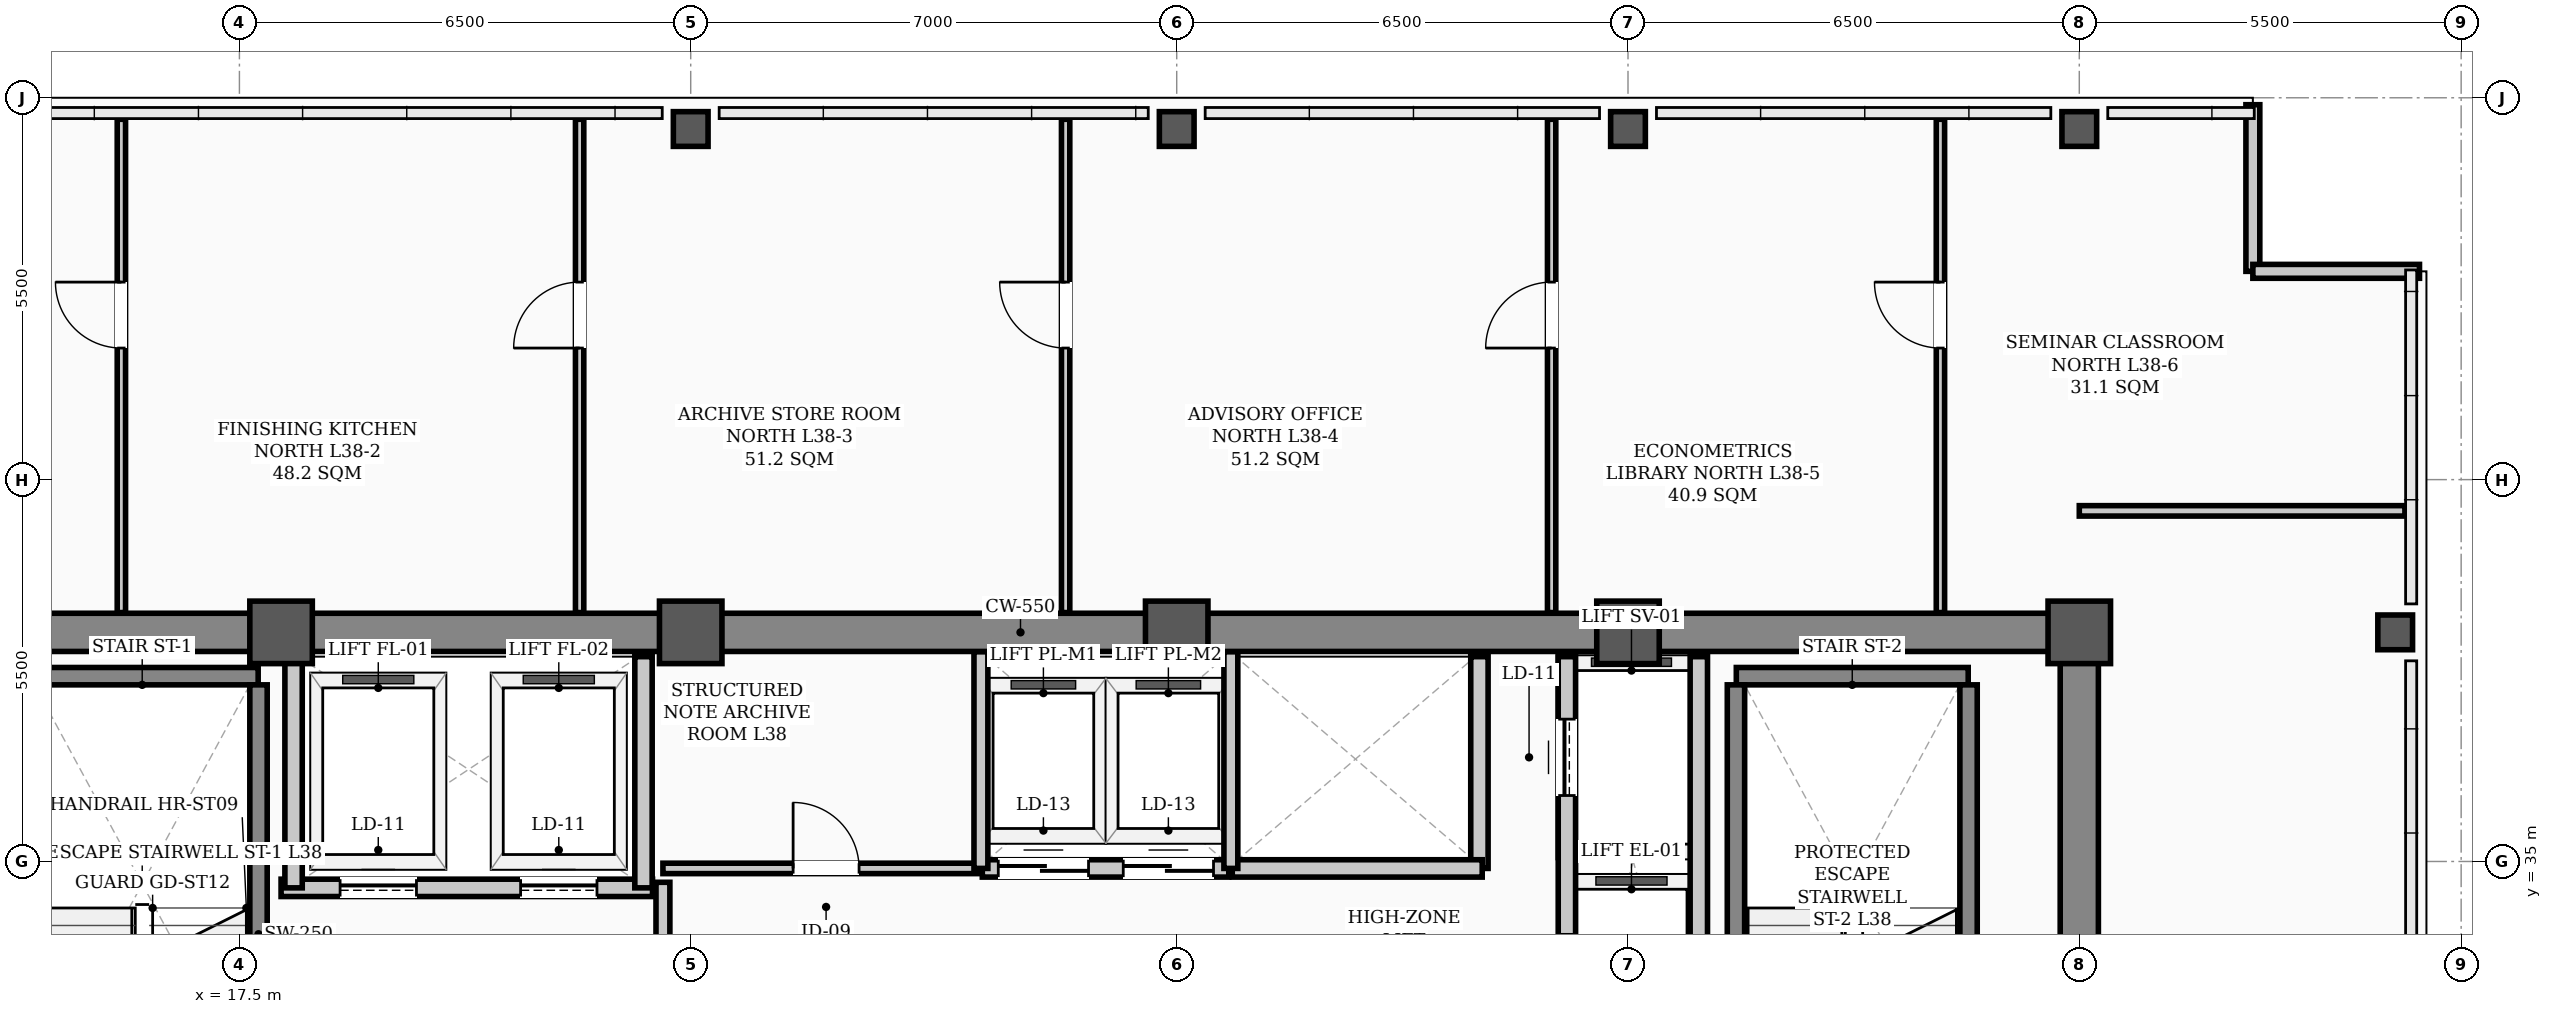
"""IFC4 building model, lengths in metres.
Left out: names, types, materials, properties, quantities, classifications, styles, units other than length and angle.
Written with IfcOpenShell. Run it as: python <this file> out.ifc"""

import sys

from ifc_helpers import new_model, si_unit, direction, frame, frame_2d, origin, origin_2d, place, context, subcontext, project, spatial, rectangle, hollow_rectangle, extrude, element, fill, save


model = new_model("IFC4")
c1 = context("Model", 3, precision=1e-05, world=origin(), true_north=direction((0.0, 1.0)))
c2 = subcontext(c1, "Body", "Model", "MODEL_VIEW")
j1 = project(units=[si_unit("LENGTHUNIT", "METRE"), si_unit("PLANEANGLEUNIT", "RADIAN")], contexts=[c1])
p1 = place(None, origin())
s1 = spatial("IfcSite", under=j1, at=p1, CompositionType="ELEMENT")
p2 = place(p1, origin())
s2 = spatial("IfcBuilding", under=s1, at=p2, CompositionType="ELEMENT")
p3 = place(p2, frame((0.0, 0.0, 153.9)))
s3 = spatial("IfcBuildingStorey", under=s2, at=p3, CompositionType="ELEMENT", Elevation=153.9)
for number, where, z_axis, x_axis in (
    (1, (18.1, 38.3, 0.0), (0.0, 0.0, 1.0), (1.0, 0.0, 0.0)),
    (2, (24.0, 38.3, 0.0), (0.0, 0.0, 1.0), (1.0, 0.0, 0.0)),
    (3, (31.0, 38.3, 0.0), (0.0, 0.0, 1.0), (1.0, 0.0, 0.0)),
    (4, (37.5, 38.3, 0.0), (0.0, 0.0, 1.0), (1.0, 0.0, 0.0)),
    (5, (44.0, 38.3, 0.0), (0.0, 0.0, 1.0), (1.0, 0.0, 0.0)),
):
    element("IfcColumn", number, at=place(p3, frame(where, z_axis=z_axis, x_axis=x_axis)), inside=s3, PredefinedType="COLUMN", context=c2, shape_type="SweptSolid", body=[
        extrude(hollow_rectangle(XDim=0.9, YDim=0.9, WallThickness=0.035, InnerFilletRadius=0.017, OuterFilletRadius=0.052, at=origin_2d()), origin(), (0.0, 0.0, 1.0), 3.9),
    ])
for number, where, z_axis, x_axis in (
    (6, (24.0, 45.55, 0.0), (0.0, 0.0, 1.0), (1.0, 0.0, 0.0)),
    (7, (31.0, 45.55, 0.0), (0.0, 0.0, 1.0), (1.0, 0.0, 0.0)),
    (8, (37.5, 45.55, 0.0), (0.0, 0.0, 1.0), (1.0, 0.0, 0.0)),
    (9, (44.0, 45.55, 0.0), (0.0, 0.0, 1.0), (1.0, 0.0, 0.0)),
    (10, (48.55, 38.3, 0.0), (0.0, 0.0, 1.0), (1.0, 0.0, 0.0)),
):
    element("IfcColumn", number, at=place(p3, frame(where, z_axis=z_axis, x_axis=x_axis)), inside=s3, PredefinedType="COLUMN", context=c2, shape_type="SweptSolid", body=[
        extrude(hollow_rectangle(XDim=0.5, YDim=0.5, WallThickness=0.024, InnerFilletRadius=0.012, OuterFilletRadius=0.036, at=origin_2d()), origin(), (0.0, 0.0, 1.0), 3.9),
    ])
for number, where, z_axis, x_axis in (
    (11, (46.5, 45.9, 0.0), (0.0, 0.0, 1.0), (0.0, -1.0, 0.0)),
    (12, (46.5, 43.5, 0.0), (0.0, 0.0, 1.0), (1.0, 0.0, 0.0)),
):
    element("IfcWall", number, at=place(p3, frame(where, z_axis=z_axis, x_axis=x_axis)), inside=s3, PredefinedType="PARAPET", context=c2, shape_type="SweptSolid", body=[
        extrude(rectangle(XDim=2.4, YDim=0.2, at=frame_2d((1.2, 0.0))), origin(), (0.0, 0.0, 1.0), 1.2),
    ])
p4 = place(p3, frame((13.5, 38.3, 0.0), z_axis=(0.0, 0.0, 1.0), x_axis=(1.0, 0.0, 0.0)))
e13 = element("IfcWall", 13, at=p4, inside=s3, PredefinedType="SHEAR", context=c2, shape_type="SweptSolid", body=[
    extrude(rectangle(XDim=30.5, YDim=0.55, at=frame_2d((15.25, 0.0))), origin(), (0.0, 0.0, 1.0), 3.72),
])
p5 = place(p3, frame((44.0, 29.35, 0.0), z_axis=(0.0, 0.0, 1.0), x_axis=(0.0, 1.0, 0.0)))
e14 = element("IfcWall", 14, at=p5, inside=s3, PredefinedType="SHEAR", context=c2, shape_type="SweptSolid", body=[
    extrude(rectangle(XDim=8.6, YDim=0.55, at=frame_2d((4.3, 0.0))), origin(), (0.0, 0.0, 1.0), 3.72),
])
p6 = place(p3, frame((14.43, 37.669, 0.0), z_axis=(0.0, 0.0, 1.0), x_axis=(1.0, 0.0, 0.0)))
e15 = element("IfcWall", 15, at=p6, inside=s3, PredefinedType="STANDARD", context=c2, shape_type="SweptSolid", body=[
    extrude(rectangle(XDim=3.34, YDim=0.25, at=frame_2d((1.67, 0.0))), origin(), (0.0, 0.0, 1.0), 3.72),
])
p7 = place(p3, frame((17.775, 30.36, 0.0), z_axis=(0.0, 0.0, 1.0), x_axis=(0.0, 1.0, 0.0)))
e16 = element("IfcWall", 16, at=p7, inside=s3, PredefinedType="STANDARD", context=c2, shape_type="SweptSolid", body=[
    extrude(rectangle(XDim=7.184, YDim=0.25, at=frame_2d((3.592, 0.0))), origin(), (0.0, 0.0, 1.0), 3.72),
])
p8 = place(p3, frame((39.06, 37.669, 0.0), z_axis=(0.0, 0.0, 1.0), x_axis=(1.0, 0.0, 0.0)))
e17 = element("IfcWall", 17, at=p8, inside=s3, PredefinedType="STANDARD", context=c2, shape_type="SweptSolid", body=[
    extrude(rectangle(XDim=3.34, YDim=0.25, at=frame_2d((1.67, 0.0))), origin(), (0.0, 0.0, 1.0), 3.72),
])
for number, where, z_axis, x_axis in (
    (18, (39.055, 30.36, 0.0), (0.0, 0.0, 1.0), (0.0, 1.0, 0.0)),
    (19, (42.405, 30.36, 0.0), (0.0, 0.0, 1.0), (0.0, 1.0, 0.0)),
):
    element("IfcWall", number, at=place(p3, frame(where, z_axis=z_axis, x_axis=x_axis)), inside=s3, PredefinedType="STANDARD", context=c2, shape_type="SweptSolid", body=[
        extrude(rectangle(XDim=7.184, YDim=0.25, at=frame_2d((3.592, 0.0))), origin(), (0.0, 0.0, 1.0), 3.72),
    ])
p9 = place(p3, frame((18.1, 34.62, 0.0), z_axis=(0.0, 0.0, 1.0), x_axis=(1.0, 0.0, 0.0)))
e20 = element("IfcWall", 20, at=p9, inside=s3, PredefinedType="STANDARD", context=c2, shape_type="SweptSolid", body=[
    extrude(rectangle(XDim=5.35, YDim=0.25, at=frame_2d((2.675, 0.0))), origin(), (0.0, 0.0, 1.0), 3.72),
])
p10 = place(p9, frame((0.85, 0.0, 0.0)))
e21 = element("IfcOpeningElement", 21, at=p10, cuts=e20, PredefinedType="OPENING", context=c2, shape_type="SweptSolid", body=[
    extrude(rectangle(XDim=1.1, YDim=2.08, at=frame_2d((0.55, 1.04))), frame((0.0, 0.135, 0.0), z_axis=(0.0, -1.0, 0.0), x_axis=(1.0, 0.0, 0.0)), (0.0, 0.0, 1.0), 0.27),
])
p11 = place(p9, frame((3.45, 0.0, 0.0)))
e22 = element("IfcOpeningElement", 22, at=p11, cuts=e20, PredefinedType="OPENING", context=c2, shape_type="SweptSolid", body=[
    extrude(rectangle(XDim=1.1, YDim=2.08, at=frame_2d((0.55, 1.04))), frame((0.0, 0.135, 0.0), z_axis=(0.0, -1.0, 0.0), x_axis=(1.0, 0.0, 0.0)), (0.0, 0.0, 1.0), 0.27),
])
p12 = place(p3, frame((36.62, 31.95, 0.0), z_axis=(0.0, 0.0, 1.0), x_axis=(0.0, 1.0, 0.0)))
e23 = element("IfcWall", 23, at=p12, inside=s3, PredefinedType="STANDARD", context=c2, shape_type="SweptSolid", body=[
    extrude(rectangle(XDim=6.0, YDim=0.25, at=frame_2d((3.0, 0.0))), origin(), (0.0, 0.0, 1.0), 3.35),
])
p13 = place(p12, frame((0.9, 0.0, 0.0)))
e24 = element("IfcOpeningElement", 24, at=p13, cuts=e23, PredefinedType="OPENING", context=c2, shape_type="SweptSolid", body=[
    extrude(rectangle(XDim=1.1, YDim=2.08, at=frame_2d((0.55, 1.04))), frame((0.0, 0.135, 0.0), z_axis=(0.0, -1.0, 0.0), x_axis=(1.0, 0.0, 0.0)), (0.0, 0.0, 1.0), 0.27),
])
p14 = place(p12, frame((4.0, 0.0, 0.0)))
e25 = element("IfcOpeningElement", 25, at=p14, cuts=e23, PredefinedType="OPENING", context=c2, shape_type="SweptSolid", body=[
    extrude(rectangle(XDim=1.1, YDim=2.08, at=frame_2d((0.55, 1.04))), frame((0.0, 0.135, 0.0), z_axis=(0.0, -1.0, 0.0), x_axis=(1.0, 0.0, 0.0)), (0.0, 0.0, 1.0), 0.27),
])
p15 = place(p3, frame((38.52, 31.95, 0.0), z_axis=(0.0, 0.0, 1.0), x_axis=(0.0, 1.0, 0.0)))
e26 = element("IfcWall", 26, at=p15, inside=s3, PredefinedType="STANDARD", context=c2, shape_type="SweptSolid", body=[
    extrude(rectangle(XDim=6.0, YDim=0.25, at=frame_2d((3.0, 0.0))), origin(), (0.0, 0.0, 1.0), 3.35),
])
for number, where, z_axis, x_axis in (
    (27, (18.28, 34.62, 0.0), (0.0, 0.0, 1.0), (0.0, 1.0, 0.0)),
    (28, (23.32, 34.62, 0.0), (0.0, 0.0, 1.0), (0.0, 1.0, 0.0)),
):
    element("IfcWall", number, at=place(p3, frame(where, z_axis=z_axis, x_axis=x_axis)), inside=s3, PredefinedType="STANDARD", context=c2, shape_type="SweptSolid", body=[
        extrude(rectangle(XDim=3.33, YDim=0.25, at=frame_2d((1.665, 0.0))), origin(), (0.0, 0.0, 1.0), 3.35),
    ])
p16 = place(p3, frame((35.36, 34.9, 0.0), z_axis=(0.0, 0.0, 1.0), x_axis=(0.0, 1.0, 0.0)))
e29 = element("IfcWall", 29, at=p16, inside=s3, PredefinedType="STANDARD", context=c2, shape_type="SweptSolid", body=[
    extrude(rectangle(XDim=3.05, YDim=0.25, at=frame_2d((1.525, 0.0))), origin(), (0.0, 0.0, 1.0), 3.35),
])
p17 = place(p3, frame((28.2, 34.9, 0.0), z_axis=(0.0, 0.0, 1.0), x_axis=(1.0, 0.0, 0.0)))
e30 = element("IfcWall", 30, at=p17, inside=s3, PredefinedType="STANDARD", context=c2, shape_type="SweptSolid", body=[
    extrude(rectangle(XDim=3.55, YDim=0.25, at=frame_2d((1.775, 0.0))), origin(), (0.0, 0.0, 1.0), 3.72),
])
p18 = place(p17, frame((0.23, 0.0, 0.0)))
e31 = element("IfcOpeningElement", 31, at=p18, cuts=e30, PredefinedType="OPENING", context=c2, shape_type="SweptSolid", body=[
    extrude(rectangle(XDim=1.3, YDim=2.08, at=frame_2d((0.65, 1.04))), frame((0.0, 0.135, 0.0), z_axis=(0.0, -1.0, 0.0), x_axis=(1.0, 0.0, 0.0)), (0.0, 0.0, 1.0), 0.27),
])
p19 = place(p17, frame((2.03, 0.0, 0.0)))
e32 = element("IfcOpeningElement", 32, at=p19, cuts=e30, PredefinedType="OPENING", context=c2, shape_type="SweptSolid", body=[
    extrude(rectangle(XDim=1.3, YDim=2.08, at=frame_2d((0.65, 1.04))), frame((0.0, 0.135, 0.0), z_axis=(0.0, -1.0, 0.0), x_axis=(1.0, 0.0, 0.0)), (0.0, 0.0, 1.0), 0.27),
])
p20 = place(p3, frame((31.8, 34.9, 0.0), z_axis=(0.0, 0.0, 1.0), x_axis=(1.0, 0.0, 0.0)))
e33 = element("IfcWall", 33, at=p20, inside=s3, PredefinedType="STANDARD", context=c2, shape_type="SweptSolid", body=[
    extrude(rectangle(XDim=3.6, YDim=0.25, at=frame_2d((1.8, 0.0))), origin(), (0.0, 0.0, 1.0), 3.72),
])
p21 = place(p3, frame((23.6, 34.9, 0.0), z_axis=(0.0, 0.0, 1.0), x_axis=(1.0, 0.0, 0.0)))
e34 = element("IfcWall", 34, at=p21, inside=s3, PredefinedType="PARTITIONING", context=c2, shape_type="SweptSolid", body=[
    extrude(rectangle(XDim=4.58, YDim=0.15, at=frame_2d((2.29, 0.0))), origin(), (0.0, 0.0, 1.0), 3.72),
])
p22 = place(p21, frame((1.875, 0.0, 0.0)))
e35 = element("IfcOpeningElement", 35, at=p22, cuts=e34, PredefinedType="OPENING", context=c2, shape_type="SweptSolid", body=[
    extrude(rectangle(XDim=0.95, YDim=2.08, at=frame_2d((0.475, 1.04))), frame((0.0, 0.085, 0.0), z_axis=(0.0, -1.0, 0.0), x_axis=(1.0, 0.0, 0.0)), (0.0, 0.0, 1.0), 0.17),
])
p23 = place(p3, frame((44.0, 40.05, 0.0), z_axis=(0.0, 0.0, 1.0), x_axis=(1.0, 0.0, 0.0)))
e36 = element("IfcWall", 36, at=p23, inside=s3, PredefinedType="PARTITIONING", context=c2, shape_type="SweptSolid", body=[
    extrude(rectangle(XDim=4.69, YDim=0.15, at=frame_2d((2.345, 0.0))), origin(), (0.0, 0.0, 1.0), 3.2),
])
p24 = place(p3, frame((23.6, 29.285, 0.0), z_axis=(0.0, 0.0, 1.0), x_axis=(0.0, 1.0, 0.0)))
e37 = element("IfcWall", 37, at=p24, inside=s3, PredefinedType="STANDARD", context=c2, shape_type="SweptSolid", body=[
    extrude(rectangle(XDim=5.415, YDim=0.2, at=frame_2d((2.708, 0.0))), origin(), (0.0, 0.0, 1.0), 3.2),
])
p25 = place(p3, frame((15.8, 38.585, 0.0), z_axis=(0.0, 0.0, 1.0), x_axis=(0.0, 1.0, 0.0)))
e38 = element("IfcWall", 38, at=p25, inside=s3, PredefinedType="PARTITIONING", context=c2, shape_type="SweptSolid", body=[
    extrude(rectangle(XDim=7.105, YDim=0.12, at=frame_2d((3.552, 0.0))), origin(), (0.0, 0.0, 1.0), 3.212),
])
p26 = place(p25, frame((3.81, 0.0, 0.0)))
e39 = element("IfcOpeningElement", 39, at=p26, cuts=e38, PredefinedType="OPENING", context=c2, shape_type="SweptSolid", body=[
    extrude(rectangle(XDim=0.95, YDim=2.08, at=frame_2d((0.475, 1.04))), frame((0.0, 0.07, 0.0), z_axis=(0.0, -1.0, 0.0), x_axis=(1.0, 0.0, 0.0)), (0.0, 0.0, 1.0), 0.14),
])
p27 = place(p3, frame((22.4, 38.585, 0.0), z_axis=(0.0, 0.0, 1.0), x_axis=(0.0, 1.0, 0.0)))
e40 = element("IfcWall", 40, at=p27, inside=s3, PredefinedType="PARTITIONING", context=c2, shape_type="SweptSolid", body=[
    extrude(rectangle(XDim=7.105, YDim=0.12, at=frame_2d((3.552, 0.0))), origin(), (0.0, 0.0, 1.0), 3.212),
])
p28 = place(p27, frame((3.81, 0.0, 0.0)))
e41 = element("IfcOpeningElement", 41, at=p28, cuts=e40, PredefinedType="OPENING", context=c2, shape_type="SweptSolid", body=[
    extrude(rectangle(XDim=0.95, YDim=2.08, at=frame_2d((0.475, 1.04))), frame((0.0, 0.07, 0.0), z_axis=(0.0, -1.0, 0.0), x_axis=(1.0, 0.0, 0.0)), (0.0, 0.0, 1.0), 0.14),
])
p29 = place(p3, frame((29.4, 38.585, 0.0), z_axis=(0.0, 0.0, 1.0), x_axis=(0.0, 1.0, 0.0)))
e42 = element("IfcWall", 42, at=p29, inside=s3, PredefinedType="PARTITIONING", context=c2, shape_type="SweptSolid", body=[
    extrude(rectangle(XDim=7.105, YDim=0.12, at=frame_2d((3.552, 0.0))), origin(), (0.0, 0.0, 1.0), 3.212),
])
p30 = place(p29, frame((3.81, 0.0, 0.0)))
e43 = element("IfcOpeningElement", 43, at=p30, cuts=e42, PredefinedType="OPENING", context=c2, shape_type="SweptSolid", body=[
    extrude(rectangle(XDim=0.95, YDim=2.08, at=frame_2d((0.475, 1.04))), frame((0.0, 0.07, 0.0), z_axis=(0.0, -1.0, 0.0), x_axis=(1.0, 0.0, 0.0)), (0.0, 0.0, 1.0), 0.14),
])
p31 = place(p3, frame((36.4, 38.585, 0.0), z_axis=(0.0, 0.0, 1.0), x_axis=(0.0, 1.0, 0.0)))
e44 = element("IfcWall", 44, at=p31, inside=s3, PredefinedType="PARTITIONING", context=c2, shape_type="SweptSolid", body=[
    extrude(rectangle(XDim=7.105, YDim=0.12, at=frame_2d((3.552, 0.0))), origin(), (0.0, 0.0, 1.0), 3.212),
])
p32 = place(p31, frame((3.81, 0.0, 0.0)))
e45 = element("IfcOpeningElement", 45, at=p32, cuts=e44, PredefinedType="OPENING", context=c2, shape_type="SweptSolid", body=[
    extrude(rectangle(XDim=0.95, YDim=2.08, at=frame_2d((0.475, 1.04))), frame((0.0, 0.07, 0.0), z_axis=(0.0, -1.0, 0.0), x_axis=(1.0, 0.0, 0.0)), (0.0, 0.0, 1.0), 0.14),
])
p33 = place(p3, frame((42.0, 38.585, 0.0), z_axis=(0.0, 0.0, 1.0), x_axis=(0.0, 1.0, 0.0)))
e46 = element("IfcWall", 46, at=p33, inside=s3, PredefinedType="PARTITIONING", context=c2, shape_type="SweptSolid", body=[
    extrude(rectangle(XDim=7.105, YDim=0.12, at=frame_2d((3.552, 0.0))), origin(), (0.0, 0.0, 1.0), 3.212),
])
p34 = place(p33, frame((3.81, 0.0, 0.0)))
e47 = element("IfcOpeningElement", 47, at=p34, cuts=e46, PredefinedType="OPENING", context=c2, shape_type="SweptSolid", body=[
    extrude(rectangle(XDim=0.95, YDim=2.08, at=frame_2d((0.475, 1.04))), frame((0.0, 0.07, 0.0), z_axis=(0.0, -1.0, 0.0), x_axis=(1.0, 0.0, 0.0)), (0.0, 0.0, 1.0), 0.14),
])
for number, where, z_axis, x_axis in (
    (48, (28.18, 34.9, 0.0), (0.0, 0.0, 1.0), (0.0, 1.0, 0.0)),
    (49, (31.78, 34.9, 0.0), (0.0, 0.0, 1.0), (0.0, 1.0, 0.0)),
):
    element("IfcWall", number, at=place(p3, frame(where, z_axis=z_axis, x_axis=x_axis)), inside=s3, PredefinedType="STANDARD", context=c2, shape_type="SweptSolid", body=[
        extrude(rectangle(XDim=3.12, YDim=0.2, at=frame_2d((1.56, 0.0))), origin(), (0.0, 0.0, 1.0), 3.35),
    ])
p35 = place(p22, origin())
e50 = element("IfcDoor", 50, at=p35, inside=s3, OperationType="SINGLE_SWING_LEFT", PredefinedType="DOOR", context=c2, shape_type="SweptSolid", body=[
    extrude(rectangle(XDim=0.95, YDim=2.08, at=frame_2d((0.475, 1.04))), frame((0.0, 0.025, 0.0), z_axis=(0.0, -1.0, 0.0), x_axis=(1.0, 0.0, 0.0)), (0.0, 0.0, 1.0), 0.05),
])
fill(e35, e50)
p36 = place(p26, origin())
e51 = element("IfcDoor", 51, at=p36, inside=s3, OperationType="SINGLE_SWING_RIGHT", PredefinedType="DOOR", context=c2, shape_type="SweptSolid", body=[
    extrude(rectangle(XDim=0.95, YDim=2.08, at=frame_2d((0.475, 1.04))), frame((0.0, 0.025, 0.0), z_axis=(0.0, -1.0, 0.0), x_axis=(1.0, 0.0, 0.0)), (0.0, 0.0, 1.0), 0.05),
])
fill(e39, e51)
p37 = place(p28, origin())
e52 = element("IfcDoor", 52, at=p37, inside=s3, OperationType="SINGLE_SWING_LEFT", PredefinedType="DOOR", context=c2, shape_type="SweptSolid", body=[
    extrude(rectangle(XDim=0.95, YDim=2.08, at=frame_2d((0.475, 1.04))), frame((0.0, 0.025, 0.0), z_axis=(0.0, -1.0, 0.0), x_axis=(1.0, 0.0, 0.0)), (0.0, 0.0, 1.0), 0.05),
])
fill(e41, e52)
p38 = place(p30, origin())
e53 = element("IfcDoor", 53, at=p38, inside=s3, OperationType="SINGLE_SWING_RIGHT", PredefinedType="DOOR", context=c2, shape_type="SweptSolid", body=[
    extrude(rectangle(XDim=0.95, YDim=2.08, at=frame_2d((0.475, 1.04))), frame((0.0, 0.025, 0.0), z_axis=(0.0, -1.0, 0.0), x_axis=(1.0, 0.0, 0.0)), (0.0, 0.0, 1.0), 0.05),
])
fill(e43, e53)
p39 = place(p32, origin())
e54 = element("IfcDoor", 54, at=p39, inside=s3, OperationType="SINGLE_SWING_LEFT", PredefinedType="DOOR", context=c2, shape_type="SweptSolid", body=[
    extrude(rectangle(XDim=0.95, YDim=2.08, at=frame_2d((0.475, 1.04))), frame((0.0, 0.025, 0.0), z_axis=(0.0, -1.0, 0.0), x_axis=(1.0, 0.0, 0.0)), (0.0, 0.0, 1.0), 0.05),
])
fill(e45, e54)
p40 = place(p34, origin())
e55 = element("IfcDoor", 55, at=p40, inside=s3, OperationType="SINGLE_SWING_RIGHT", PredefinedType="DOOR", context=c2, shape_type="SweptSolid", body=[
    extrude(rectangle(XDim=0.95, YDim=2.08, at=frame_2d((0.475, 1.04))), frame((0.0, 0.025, 0.0), z_axis=(0.0, -1.0, 0.0), x_axis=(1.0, 0.0, 0.0)), (0.0, 0.0, 1.0), 0.05),
])
fill(e47, e55)
p41 = place(p10, origin())
e56 = element("IfcDoor", 56, at=p41, inside=s3, OperationType="SLIDING_TO_LEFT", PredefinedType="DOOR", context=c2, shape_type="SweptSolid", body=[
    extrude(rectangle(XDim=1.1, YDim=2.08, at=frame_2d((0.55, 1.04))), frame((0.0, 0.025, 0.0), z_axis=(0.0, -1.0, 0.0), x_axis=(1.0, 0.0, 0.0)), (0.0, 0.0, 1.0), 0.05),
])
fill(e21, e56)
p42 = place(p11, origin())
e57 = element("IfcDoor", 57, at=p42, inside=s3, OperationType="SLIDING_TO_LEFT", PredefinedType="DOOR", context=c2, shape_type="SweptSolid", body=[
    extrude(rectangle(XDim=1.1, YDim=2.08, at=frame_2d((0.55, 1.04))), frame((0.0, 0.025, 0.0), z_axis=(0.0, -1.0, 0.0), x_axis=(1.0, 0.0, 0.0)), (0.0, 0.0, 1.0), 0.05),
])
fill(e22, e57)
p43 = place(p14, origin())
e58 = element("IfcDoor", 58, at=p43, inside=s3, OperationType="SLIDING_TO_LEFT", PredefinedType="DOOR", context=c2, shape_type="SweptSolid", body=[
    extrude(rectangle(XDim=1.1, YDim=2.08, at=frame_2d((0.55, 1.04))), frame((0.0, 0.025, 0.0), z_axis=(0.0, -1.0, 0.0), x_axis=(1.0, 0.0, 0.0)), (0.0, 0.0, 1.0), 0.05),
])
fill(e25, e58)
p44 = place(p18, origin())
e59 = element("IfcDoor", 59, at=p44, inside=s3, OperationType="DOUBLE_DOOR_SLIDING", PredefinedType="DOOR", context=c2, shape_type="SweptSolid", body=[
    extrude(rectangle(XDim=1.3, YDim=2.08, at=frame_2d((0.65, 1.04))), frame((0.0, 0.025, 0.0), z_axis=(0.0, -1.0, 0.0), x_axis=(1.0, 0.0, 0.0)), (0.0, 0.0, 1.0), 0.05),
])
fill(e31, e59)
p45 = place(p19, origin())
e60 = element("IfcDoor", 60, at=p45, inside=s3, OperationType="DOUBLE_DOOR_SLIDING", PredefinedType="DOOR", context=c2, shape_type="SweptSolid", body=[
    extrude(rectangle(XDim=1.3, YDim=2.08, at=frame_2d((0.65, 1.04))), frame((0.0, 0.025, 0.0), z_axis=(0.0, -1.0, 0.0), x_axis=(1.0, 0.0, 0.0)), (0.0, 0.0, 1.0), 0.05),
])
fill(e32, e60)
save(model, sys.argv[1])
